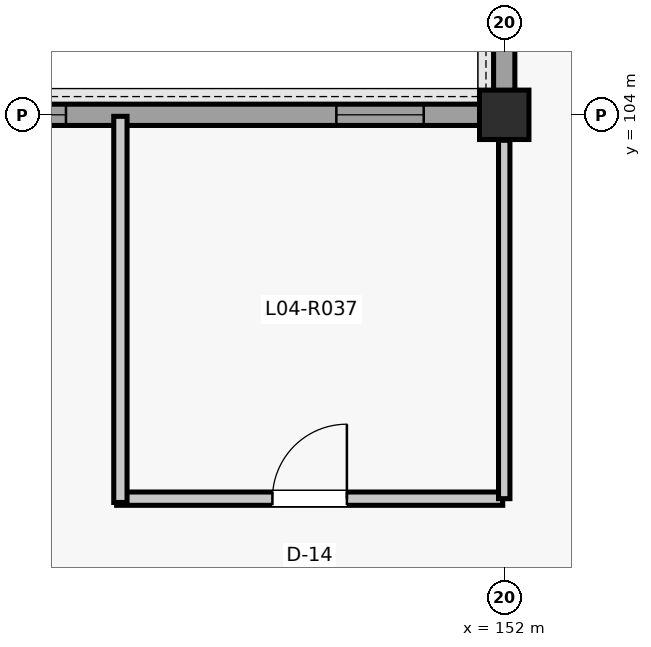
"""IFC4 building model, lengths in metres.
Left out: names, types, materials, properties, quantities, classifications, styles, units other than length and angle.
Written with IfcOpenShell. Run it as: python <this file> out.ifc"""

import sys

from ifc_helpers import new_model, si_unit, direction, frame, frame_2d, origin, origin_2d, place, context, subcontext, project, spatial, rectangle, extrude, element, fill, save


model = new_model("IFC4")
c1 = context("Model", 3, precision=1e-05, world=origin(), true_north=direction((0.0, 1.0)))
c2 = subcontext(c1, "Body", "Model", "MODEL_VIEW")
j1 = project(units=[si_unit("LENGTHUNIT", "METRE"), si_unit("PLANEANGLEUNIT", "RADIAN")], contexts=[c1])
p1 = place(None, origin())
s1 = spatial("IfcSite", under=j1, at=p1, CompositionType="ELEMENT")
p2 = place(p1, origin())
s2 = spatial("IfcBuilding", under=s1, at=p2, CompositionType="ELEMENT")
p3 = place(p2, frame((0.0, 0.0, 17.82)))
s3 = spatial("IfcBuildingStorey", under=s2, at=p3, CompositionType="ELEMENT", Elevation=17.82)
p4 = place(p3, frame((152.0, 104.0, 0.0), z_axis=(0.0, 0.0, 1.0), x_axis=(1.0, 0.0, 0.0)))
e1 = element("IfcColumn", 1, at=p4, inside=s3, PredefinedType="COLUMN", context=c2, shape_type="SweptSolid", body=[
    extrude(rectangle(XDim=0.65, YDim=0.65, at=origin_2d()), origin(), (0.0, 0.0, 1.0), 3.96),
])
p5 = place(p3, frame((144.335, 104.0, 0.0), z_axis=(0.0, 0.0, 1.0), x_axis=(1.0, 0.0, 0.0)))
e2 = element("IfcWall", 2, at=p5, inside=s3, PredefinedType="SOLIDWALL", context=c2, shape_type="SweptSolid", body=[
    extrude(rectangle(XDim=7.355, YDim=0.28, at=frame_2d((3.677, 0.0))), origin(), (0.0, 0.0, 1.0), 3.377),
])
p6 = place(p5, frame((0.749, 0.0, 0.95)))
e3 = element("IfcOpeningElement", 3, at=p6, cuts=e2, PredefinedType="OPENING", context=c2, shape_type="SweptSolid", body=[
    extrude(rectangle(XDim=1.15, YDim=1.65, at=frame_2d((0.575, 0.825))), frame((0.0, 0.15, 0.0), z_axis=(0.0, -1.0, 0.0), x_axis=(1.0, 0.0, 0.0)), (0.0, 0.0, 1.0), 0.3),
])
p7 = place(p5, frame((5.456, 0.0, 0.95)))
e4 = element("IfcOpeningElement", 4, at=p7, cuts=e2, PredefinedType="OPENING", context=c2, shape_type="SweptSolid", body=[
    extrude(rectangle(XDim=1.15, YDim=1.65, at=frame_2d((0.575, 0.825))), frame((0.0, 0.15, 0.0), z_axis=(0.0, -1.0, 0.0), x_axis=(1.0, 0.0, 0.0)), (0.0, 0.0, 1.0), 0.3),
])
p8 = place(p3, frame((152.0, 104.31, 0.0), z_axis=(0.0, 0.0, 1.0), x_axis=(0.0, 1.0, 0.0)))
e5 = element("IfcWall", 5, at=p8, inside=s3, PredefinedType="SOLIDWALL", context=c2, shape_type="SweptSolid", body=[
    extrude(rectangle(XDim=7.38, YDim=0.28, at=frame_2d((3.69, 0.0))), origin(), (0.0, 0.0, 1.0), 3.285),
])
p9 = place(p8, frame((0.729, 0.0, 0.95)))
e6 = element("IfcOpeningElement", 6, at=p9, cuts=e5, PredefinedType="OPENING", context=c2, shape_type="SweptSolid", body=[
    extrude(rectangle(XDim=1.2, YDim=1.8, at=frame_2d((0.6, 0.9))), frame((0.0, 0.15, 0.0), z_axis=(0.0, -1.0, 0.0), x_axis=(1.0, 0.0, 0.0)), (0.0, 0.0, 1.0), 0.3),
])
p10 = place(p8, frame((5.452, 0.0, 0.95)))
e7 = element("IfcOpeningElement", 7, at=p10, cuts=e5, PredefinedType="OPENING", context=c2, shape_type="SweptSolid", body=[
    extrude(rectangle(XDim=1.2, YDim=1.8, at=frame_2d((0.6, 0.9))), frame((0.0, 0.15, 0.0), z_axis=(0.0, -1.0, 0.0), x_axis=(1.0, 0.0, 0.0)), (0.0, 0.0, 1.0), 0.3),
])
p11 = place(p3, frame((146.9, 98.95, 0.0), z_axis=(0.0, 0.0, 1.0), x_axis=(1.0, 0.0, 0.0)))
e8 = element("IfcWall", 8, at=p11, inside=s3, PredefinedType="PARTITIONING", context=c2, shape_type="SweptSolid", body=[
    extrude(rectangle(XDim=5.08, YDim=0.175, at=frame_2d((2.54, 0.0))), origin(), (0.0, 0.0, 1.0), 3.263),
])
p12 = place(p11, frame((2.05, 0.0, 0.0)))
e9 = element("IfcOpeningElement", 9, at=p12, cuts=e8, PredefinedType="OPENING", context=c2, shape_type="SweptSolid", body=[
    extrude(rectangle(XDim=0.98, YDim=2.15, at=frame_2d((0.49, 1.075))), frame((0.0, 0.097, 0.0), z_axis=(0.0, -1.0, 0.0), x_axis=(1.0, 0.0, 0.0)), (0.0, 0.0, 1.0), 0.195),
])
p13 = place(p3, frame((146.95, 98.9, 0.0), z_axis=(0.0, 0.0, 1.0), x_axis=(0.0, 1.0, 0.0)))
e10 = element("IfcWall", 10, at=p13, inside=s3, PredefinedType="PARTITIONING", context=c2, shape_type="SweptSolid", body=[
    extrude(rectangle(XDim=5.08, YDim=0.175, at=frame_2d((2.54, 0.0))), origin(), (0.0, 0.0, 1.0), 3.37),
])
p14 = place(p3, frame((152.0, 98.95, 0.0), z_axis=(0.0, 0.0, 1.0), x_axis=(0.0, 1.0, 0.0)))
e11 = element("IfcWall", 11, at=p14, inside=s3, PredefinedType="PARTITIONING", context=c2, shape_type="SweptSolid", body=[
    extrude(rectangle(XDim=4.715, YDim=0.15, at=frame_2d((2.357, 0.0))), origin(), (0.0, 0.0, 1.0), 3.263),
])
p15 = place(p6, origin())
e12 = element("IfcWindow", 12, at=p15, inside=s3, PartitioningType="SINGLE_PANEL", PredefinedType="WINDOW", context=c2, shape_type="SweptSolid", body=[
    extrude(rectangle(XDim=1.15, YDim=1.65, at=frame_2d((0.575, 0.825))), frame((0.0, 0.03, 0.0), z_axis=(0.0, -1.0, 0.0), x_axis=(1.0, 0.0, 0.0)), (0.0, 0.0, 1.0), 0.06),
])
fill(e3, e12)
p16 = place(p7, origin())
e13 = element("IfcWindow", 13, at=p16, inside=s3, PartitioningType="SINGLE_PANEL", PredefinedType="WINDOW", context=c2, shape_type="SweptSolid", body=[
    extrude(rectangle(XDim=1.15, YDim=1.65, at=frame_2d((0.575, 0.825))), frame((0.0, 0.03, 0.0), z_axis=(0.0, -1.0, 0.0), x_axis=(1.0, 0.0, 0.0)), (0.0, 0.0, 1.0), 0.06),
])
fill(e4, e13)
p17 = place(p12, origin())
e14 = element("IfcDoor", 14, at=p17, inside=s3, OperationType="SINGLE_SWING_RIGHT", PredefinedType="DOOR", context=c2, shape_type="SweptSolid", body=[
    extrude(rectangle(XDim=0.98, YDim=2.15, at=frame_2d((0.49, 1.075))), frame((0.0, 0.025, 0.0), z_axis=(0.0, -1.0, 0.0), x_axis=(1.0, 0.0, 0.0)), (0.0, 0.0, 1.0), 0.05),
])
fill(e9, e14)
save(model, sys.argv[1])
